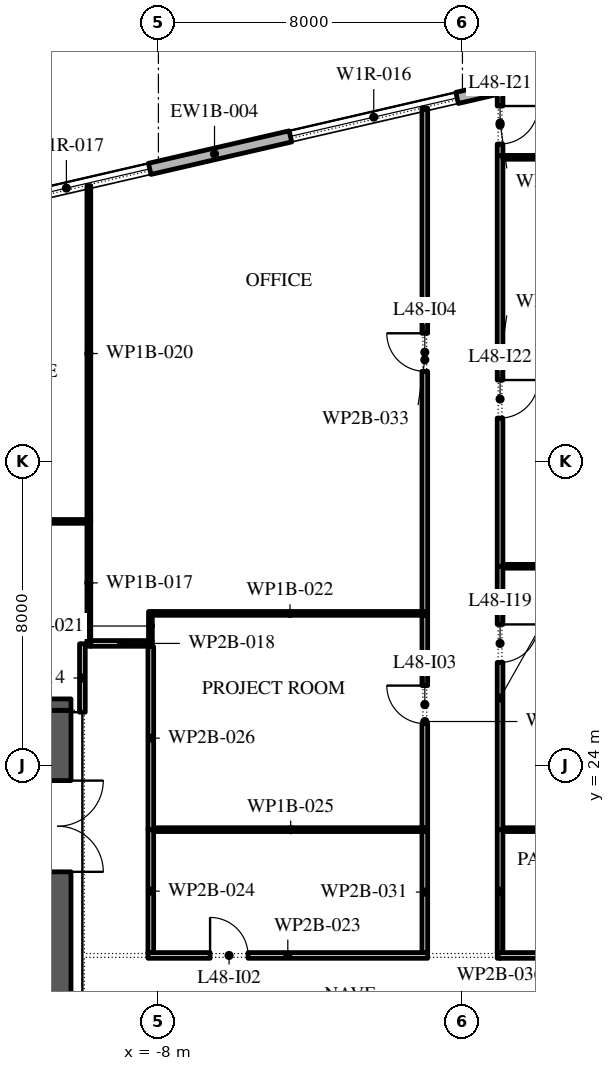
"""IFC4 building model, lengths in metres.
Left out: names, types, materials, properties, quantities, classifications, styles, units other than length and angle.
Written with IfcOpenShell. Run it as: python <this file> out.ifc"""

import sys

from ifc_helpers import new_model, si_unit, direction, frame, frame_2d, origin, place, context, subcontext, project, spatial, rectangle, extrude, element, fill, save


model = new_model("IFC4")
c1 = context("Model", 3, precision=1e-05, world=origin(), true_north=direction((0.0, 1.0)))
c2 = subcontext(c1, "Body", "Model", "MODEL_VIEW")
j1 = project(units=[si_unit("LENGTHUNIT", "METRE"), si_unit("PLANEANGLEUNIT", "RADIAN")], contexts=[c1])
p1 = place(None, origin())
s1 = spatial("IfcSite", under=j1, at=p1, CompositionType="ELEMENT")
p2 = place(p1, origin())
s2 = spatial("IfcBuilding", under=s1, at=p2, CompositionType="ELEMENT")
p3 = place(p2, frame((0.0, 0.0, 217.8)))
s3 = spatial("IfcBuildingStorey", under=s2, at=p3, CompositionType="ELEMENT", Elevation=217.8)
p4 = place(p3, frame((17.592, 45.657, 0.0), z_axis=(0.0, 0.0, 1.0), x_axis=(-0.974370243697, -0.224950279389, 0.0)))
e1 = element("IfcWall", 1, at=p4, inside=s3, PredefinedType="STANDARD", context=c2, shape_type="SweptSolid", body=[
    extrude(rectangle(XDim=49.5, YDim=0.3, at=frame_2d((24.75, 0.0))), origin(), (0.0, 0.0, 1.0), 3.95),
])
p5 = place(p4, frame((3.6, 0.0, 0.0)))
e2 = element("IfcOpeningElement", 2, at=p5, cuts=e1, PredefinedType="OPENING", context=c2, shape_type="SweptSolid", body=[
    extrude(rectangle(XDim=2.4, YDim=2.85, at=frame_2d((1.2, 1.425))), frame((0.0, 0.16, 0.0), z_axis=(0.0, -1.0, 0.0), x_axis=(1.0, 0.0, 0.0)), (0.0, 0.0, 1.0), 0.32),
])
p6 = place(p4, frame((9.9, 0.0, 0.45)))
e3 = element("IfcOpeningElement", 3, at=p6, cuts=e1, PredefinedType="OPENING", context=c2, shape_type="SweptSolid", body=[
    extrude(rectangle(XDim=4.5, YDim=2.4, at=frame_2d((2.25, 1.2))), frame((0.0, 0.16, 0.0), z_axis=(0.0, -1.0, 0.0), x_axis=(1.0, 0.0, 0.0)), (0.0, 0.0, 1.0), 0.32),
])
p7 = place(p4, frame((18.2, 0.0, 0.45)))
e4 = element("IfcOpeningElement", 4, at=p7, cuts=e1, PredefinedType="OPENING", context=c2, shape_type="SweptSolid", body=[
    extrude(rectangle(XDim=4.5, YDim=2.4, at=frame_2d((2.25, 1.2))), frame((0.0, 0.16, 0.0), z_axis=(0.0, -1.0, 0.0), x_axis=(1.0, 0.0, 0.0)), (0.0, 0.0, 1.0), 0.32),
])
p8 = place(p4, frame((26.5, 0.0, 0.45)))
e5 = element("IfcOpeningElement", 5, at=p8, cuts=e1, PredefinedType="OPENING", context=c2, shape_type="SweptSolid", body=[
    extrude(rectangle(XDim=4.5, YDim=2.4, at=frame_2d((2.25, 1.2))), frame((0.0, 0.16, 0.0), z_axis=(0.0, -1.0, 0.0), x_axis=(1.0, 0.0, 0.0)), (0.0, 0.0, 1.0), 0.32),
])
p9 = place(p4, frame((35.85, 0.0, 0.0)))
e6 = element("IfcOpeningElement", 6, at=p9, cuts=e1, PredefinedType="OPENING", context=c2, shape_type="SweptSolid", body=[
    extrude(rectangle(XDim=2.4, YDim=3.5, at=frame_2d((1.2, 1.75))), frame((0.0, 0.16, 0.0), z_axis=(0.0, -1.0, 0.0), x_axis=(1.0, 0.0, 0.0)), (0.0, 0.0, 1.0), 0.32),
])
p10 = place(p4, frame((43.1, 0.0, 0.45)))
e7 = element("IfcOpeningElement", 7, at=p10, cuts=e1, PredefinedType="OPENING", context=c2, shape_type="SweptSolid", body=[
    extrude(rectangle(XDim=4.5, YDim=2.525, at=frame_2d((2.25, 1.262))), frame((0.0, 0.16, 0.0), z_axis=(0.0, -1.0, 0.0), x_axis=(1.0, 0.0, 0.0)), (0.0, 0.0, 1.0), 0.32),
])
p11 = place(p3, frame((-10.65, -2.45, 0.0), z_axis=(0.0, 0.0, 1.0), x_axis=(0.0, 1.0, 0.0)))
e8 = element("IfcWall", 8, at=p11, inside=s3, PredefinedType="SHEAR", context=c2, shape_type="SweptSolid", body=[
    extrude(rectangle(XDim=27.9, YDim=0.7, at=frame_2d((13.95, 0.0))), origin(), (0.0, 0.0, 1.0), 3.95),
])
p12 = place(p11, frame((23.65, 0.0, 0.0)))
e9 = element("IfcOpeningElement", 9, at=p12, cuts=e8, PredefinedType="OPENING", context=c2, shape_type="SweptSolid", body=[
    extrude(rectangle(XDim=2.4, YDim=2.1, at=frame_2d((1.2, 1.05))), frame((0.0, 0.36, 0.0), z_axis=(0.0, -1.0, 0.0), x_axis=(1.0, 0.0, 0.0)), (0.0, 0.0, 1.0), 0.72),
])
p13 = place(p11, frame((1.087, 0.0, 0.0)))
e10 = element("IfcOpeningElement", 10, at=p13, cuts=e8, PredefinedType="OPENING", context=c2, shape_type="SweptSolid", body=[
    extrude(rectangle(XDim=0.9, YDim=2.1, at=frame_2d((0.45, 1.05))), frame((0.0, 0.36, 0.0), z_axis=(0.0, -1.0, 0.0), x_axis=(1.0, 0.0, 0.0)), (0.0, 0.0, 1.0), 0.72),
])
p14 = place(p11, frame((4.262, 0.0, 0.0)))
e11 = element("IfcOpeningElement", 11, at=p14, cuts=e8, PredefinedType="OPENING", context=c2, shape_type="SweptSolid", body=[
    extrude(rectangle(XDim=1.0, YDim=2.1, at=frame_2d((0.5, 1.05))), frame((0.0, 0.36, 0.0), z_axis=(0.0, -1.0, 0.0), x_axis=(1.0, 0.0, 0.0)), (0.0, 0.0, 1.0), 0.72),
])
p15 = place(p3, frame((-21.7, 25.6, 0.0), z_axis=(0.0, 0.0, 1.0), x_axis=(1.0, 0.0, 0.0)))
e12 = element("IfcWall", 12, at=p15, inside=s3, PredefinedType="SHEAR", context=c2, shape_type="SweptSolid", body=[
    extrude(rectangle(XDim=11.4, YDim=0.3, at=frame_2d((5.7, 0.0))), origin(), (0.0, 0.0, 1.0), 3.95),
])
p16 = place(p3, frame((-10.0, 25.4, 0.0), z_axis=(0.0, 0.0, 1.0), x_axis=(0.0, 1.0, 0.0)))
e13 = element("IfcWall", 13, at=p16, inside=s3, PredefinedType="PARTITIONING", context=c2, shape_type="SweptSolid", body=[
    extrude(rectangle(XDim=1.8, YDim=0.15, at=frame_2d((0.9, 0.0))), origin(), (0.0, 0.0, 1.0), 3.95),
])
p17 = place(p3, frame((-9.83, 27.135, 0.0), z_axis=(0.0, 0.0, 1.0), x_axis=(0.0, 1.0, 0.0)))
e14 = element("IfcWall", 14, at=p17, inside=s3, PredefinedType="PARTITIONING", context=c2, shape_type="SweptSolid", body=[
    extrude(rectangle(XDim=3.335, YDim=0.1, at=frame_2d((1.667, 0.0))), origin(), (0.0, 0.0, 1.0), 3.95),
])
p18 = place(p3, frame((-9.78, 27.21, 0.0), z_axis=(0.0, 0.0, 1.0), x_axis=(1.0, 0.0, 0.0)))
e15 = element("IfcWall", 15, at=p18, inside=s3, PredefinedType="PARTITIONING", context=c2, shape_type="SweptSolid", body=[
    extrude(rectangle(XDim=1.62, YDim=0.15, at=frame_2d((0.81, 0.0))), origin(), (0.0, 0.0, 1.0), 3.95),
])
p19 = place(p3, frame((-9.88, 30.42, 0.0), z_axis=(0.0, 0.0, 1.0), x_axis=(-1.0, 0.0, 0.0)))
e16 = element("IfcWall", 16, at=p19, inside=s3, PredefinedType="PARTITIONING", context=c2, shape_type="SweptSolid", body=[
    extrude(rectangle(XDim=12.59, YDim=0.1, at=frame_2d((6.295, 0.0))), origin(), (0.0, 0.0, 1.0), 3.95),
])
p20 = place(p3, frame((-9.83, 30.42, 0.0), z_axis=(0.0, 0.0, 1.0), x_axis=(0.0, 1.0, 0.0)))
e17 = element("IfcWall", 17, at=p20, inside=s3, PredefinedType="PARTITIONING", context=c2, shape_type="SweptSolid", body=[
    extrude(rectangle(XDim=8.835, YDim=0.1, at=frame_2d((4.417, 0.0))), origin(), (0.0, 0.0, 1.0), 3.95),
])
p21 = place(p3, frame((-8.21, 27.285, 0.0), z_axis=(0.0, 0.0, 1.0), x_axis=(0.0, 1.0, 0.0)))
e18 = element("IfcWall", 18, at=p21, inside=s3, PredefinedType="PARTITIONING", context=c2, shape_type="SweptSolid", body=[
    extrude(rectangle(XDim=0.765, YDim=0.1, at=frame_2d((0.383, 0.0))), origin(), (0.0, 0.0, 1.0), 3.95),
])
p22 = place(p3, frame((-8.16, 28.0, 0.0), z_axis=(0.0, 0.0, 1.0), x_axis=(1.0, 0.0, 0.0)))
e19 = element("IfcWall", 19, at=p22, inside=s3, PredefinedType="PARTITIONING", context=c2, shape_type="SweptSolid", body=[
    extrude(rectangle(XDim=7.245, YDim=0.1, at=frame_2d((3.623, 0.0))), origin(), (0.0, 0.0, 1.0), 3.95),
])
p23 = place(p3, frame((-8.275, 19.0, 0.0), z_axis=(0.0, 0.0, 1.0), x_axis=(1.0, 0.0, 0.0)))
e20 = element("IfcWall", 20, at=p23, inside=s3, PredefinedType="PARTITIONING", context=c2, shape_type="SweptSolid", body=[
    extrude(rectangle(XDim=7.36, YDim=0.15, at=frame_2d((3.68, 0.0))), origin(), (0.0, 0.0, 1.0), 3.95),
])
p24 = place(p23, frame((1.635, 0.0, 0.0)))
e21 = element("IfcOpeningElement", 21, at=p24, cuts=e20, PredefinedType="OPENING", context=c2, shape_type="SweptSolid", body=[
    extrude(rectangle(XDim=1.0, YDim=2.1, at=frame_2d((0.5, 1.05))), frame((0.0, 0.085, 0.0), z_axis=(0.0, -1.0, 0.0), x_axis=(1.0, 0.0, 0.0)), (0.0, 0.0, 1.0), 0.17),
])
p25 = place(p3, frame((-8.2, 22.31, 0.0), z_axis=(0.0, 0.0, 1.0), x_axis=(0.0, -1.0, 0.0)))
e22 = element("IfcWall", 22, at=p25, inside=s3, PredefinedType="PARTITIONING", context=c2, shape_type="SweptSolid", body=[
    extrude(rectangle(XDim=3.235, YDim=0.15, at=frame_2d((1.618, 0.0))), origin(), (0.0, 0.0, 1.0), 3.95),
])
p26 = place(p3, frame((-8.125, 22.31, 0.0), z_axis=(0.0, 0.0, 1.0), x_axis=(1.0, 0.0, 0.0)))
e23 = element("IfcWall", 23, at=p26, inside=s3, PredefinedType="PARTITIONING", context=c2, shape_type="SweptSolid", body=[
    extrude(rectangle(XDim=7.21, YDim=0.1, at=frame_2d((3.605, 0.0))), origin(), (0.0, 0.0, 1.0), 3.95),
])
p27 = place(p3, frame((-8.2, 27.125, 0.0), z_axis=(0.0, 0.0, 1.0), x_axis=(0.0, -1.0, 0.0)))
e24 = element("IfcWall", 24, at=p27, inside=s3, PredefinedType="PARTITIONING", context=c2, shape_type="SweptSolid", body=[
    extrude(rectangle(XDim=4.815, YDim=0.15, at=frame_2d((2.407, 0.0))), origin(), (0.0, 0.0, 1.0), 3.95),
])
p28 = place(p3, frame((-0.99, 19.075, 0.0), z_axis=(0.0, 0.0, 1.0), x_axis=(0.0, 1.0, 0.0)))
e25 = element("IfcWall", 25, at=p28, inside=s3, PredefinedType="PARTITIONING", context=c2, shape_type="SweptSolid", body=[
    extrude(rectangle(XDim=3.185, YDim=0.15, at=frame_2d((1.593, 0.0))), origin(), (0.0, 0.0, 1.0), 3.95),
])
p29 = place(p3, frame((-0.99, 22.36, 0.0), z_axis=(0.0, 0.0, 1.0), x_axis=(0.0, 1.0, 0.0)))
e26 = element("IfcWall", 26, at=p29, inside=s3, PredefinedType="PARTITIONING", context=c2, shape_type="SweptSolid", body=[
    extrude(rectangle(XDim=5.59, YDim=0.15, at=frame_2d((2.795, 0.0))), origin(), (0.0, 0.0, 1.0), 3.95),
])
p30 = place(p29, frame((2.74, 0.0, 0.0)))
e27 = element("IfcOpeningElement", 27, at=p30, cuts=e26, PredefinedType="OPENING", context=c2, shape_type="SweptSolid", body=[
    extrude(rectangle(XDim=1.0, YDim=2.1, at=frame_2d((0.5, 1.05))), frame((0.0, 0.085, 0.0), z_axis=(0.0, -1.0, 0.0), x_axis=(1.0, 0.0, 0.0)), (0.0, 0.0, 1.0), 0.17),
])
p31 = place(p3, frame((-0.99, 28.05, 0.0), z_axis=(0.0, 0.0, 1.0), x_axis=(0.0, 1.0, 0.0)))
e28 = element("IfcWall", 28, at=p31, inside=s3, PredefinedType="PARTITIONING", context=c2, shape_type="SweptSolid", body=[
    extrude(rectangle(XDim=13.246, YDim=0.15, at=frame_2d((6.623, 0.0))), origin(), (0.0, 0.0, 1.0), 3.95),
])
p32 = place(p31, frame((6.32, 0.0, 0.0)))
e29 = element("IfcOpeningElement", 29, at=p32, cuts=e28, PredefinedType="OPENING", context=c2, shape_type="SweptSolid", body=[
    extrude(rectangle(XDim=1.0, YDim=2.1, at=frame_2d((0.5, 1.05))), frame((0.0, 0.085, 0.0), z_axis=(0.0, -1.0, 0.0), x_axis=(1.0, 0.0, 0.0)), (0.0, 0.0, 1.0), 0.17),
])
p33 = place(p3, frame((0.915, 19.0, 0.0), z_axis=(0.0, 0.0, 1.0), x_axis=(1.0, 0.0, 0.0)))
e30 = element("IfcWall", 30, at=p33, inside=s3, PredefinedType="PARTITIONING", context=c2, shape_type="SweptSolid", body=[
    extrude(rectangle(XDim=7.36, YDim=0.15, at=frame_2d((3.68, 0.0))), origin(), (0.0, 0.0, 1.0), 3.95),
])
p34 = place(p33, frame((2.385, 0.0, 0.0)))
e31 = element("IfcOpeningElement", 31, at=p34, cuts=e30, PredefinedType="OPENING", context=c2, shape_type="SweptSolid", body=[
    extrude(rectangle(XDim=1.0, YDim=2.1, at=frame_2d((0.5, 1.05))), frame((0.0, 0.085, 0.0), z_axis=(0.0, -1.0, 0.0), x_axis=(1.0, 0.0, 0.0)), (0.0, 0.0, 1.0), 0.17),
])
p35 = place(p3, frame((0.99, 22.31, 0.0), z_axis=(0.0, 0.0, 1.0), x_axis=(0.0, -1.0, 0.0)))
e32 = element("IfcWall", 32, at=p35, inside=s3, PredefinedType="PARTITIONING", context=c2, shape_type="SweptSolid", body=[
    extrude(rectangle(XDim=3.235, YDim=0.15, at=frame_2d((1.618, 0.0))), origin(), (0.0, 0.0, 1.0), 3.95),
])
p36 = place(p3, frame((1.065, 22.31, 0.0), z_axis=(0.0, 0.0, 1.0), x_axis=(1.0, 0.0, 0.0)))
e33 = element("IfcWall", 33, at=p36, inside=s3, PredefinedType="PARTITIONING", context=c2, shape_type="SweptSolid", body=[
    extrude(rectangle(XDim=7.21, YDim=0.1, at=frame_2d((3.605, 0.0))), origin(), (0.0, 0.0, 1.0), 3.95),
])
p37 = place(p3, frame((0.99, 29.24, 0.0), z_axis=(0.0, 0.0, 1.0), x_axis=(0.0, -1.0, 0.0)))
e34 = element("IfcWall", 34, at=p37, inside=s3, PredefinedType="PARTITIONING", context=c2, shape_type="SweptSolid", body=[
    extrude(rectangle(XDim=6.93, YDim=0.15, at=frame_2d((3.465, 0.0))), origin(), (0.0, 0.0, 1.0), 3.95),
])
p38 = place(p37, frame((1.53, 0.0, 0.0)))
e35 = element("IfcOpeningElement", 35, at=p38, cuts=e34, PredefinedType="OPENING", context=c2, shape_type="SweptSolid", body=[
    extrude(rectangle(XDim=1.0, YDim=2.1, at=frame_2d((0.5, 1.05))), frame((0.0, 0.085, 0.0), z_axis=(0.0, -1.0, 0.0), x_axis=(1.0, 0.0, 0.0)), (0.0, 0.0, 1.0), 0.17),
])
p39 = place(p3, frame((1.065, 29.24, 0.0), z_axis=(0.0, 0.0, 1.0), x_axis=(1.0, 0.0, 0.0)))
e36 = element("IfcWall", 36, at=p39, inside=s3, PredefinedType="PARTITIONING", context=c2, shape_type="SweptSolid", body=[
    extrude(rectangle(XDim=7.145, YDim=0.1, at=frame_2d((3.573, 0.0))), origin(), (0.0, 0.0, 1.0), 3.95),
])
p40 = place(p3, frame((0.99, 40.05, 0.0), z_axis=(0.0, 0.0, 1.0), x_axis=(0.0, -1.0, 0.0)))
e37 = element("IfcWall", 37, at=p40, inside=s3, PredefinedType="PARTITIONING", context=c2, shape_type="SweptSolid", body=[
    extrude(rectangle(XDim=10.81, YDim=0.15, at=frame_2d((5.405, 0.0))), origin(), (0.0, 0.0, 1.0), 3.95),
])
p41 = place(p40, frame((5.91, 0.0, 0.0)))
e38 = element("IfcOpeningElement", 38, at=p41, cuts=e37, PredefinedType="OPENING", context=c2, shape_type="SweptSolid", body=[
    extrude(rectangle(XDim=1.0, YDim=2.1, at=frame_2d((0.5, 1.05))), frame((0.0, 0.085, 0.0), z_axis=(0.0, -1.0, 0.0), x_axis=(1.0, 0.0, 0.0)), (0.0, 0.0, 1.0), 0.17),
])
p42 = place(p3, frame((0.99, 41.753, 0.0), z_axis=(0.0, 0.0, 1.0), x_axis=(0.0, -1.0, 0.0)))
e39 = element("IfcWall", 39, at=p42, inside=s3, PredefinedType="PARTITIONING", context=c2, shape_type="SweptSolid", body=[
    extrude(rectangle(XDim=1.703, YDim=0.15, at=frame_2d((0.852, 0.0))), origin(), (0.0, 0.0, 1.0), 3.95),
])
p43 = place(p42, frame((0.403, 0.0, 0.0)))
e40 = element("IfcOpeningElement", 40, at=p43, cuts=e39, PredefinedType="OPENING", context=c2, shape_type="SweptSolid", body=[
    extrude(rectangle(XDim=1.0, YDim=2.1, at=frame_2d((0.5, 1.05))), frame((0.0, 0.085, 0.0), z_axis=(0.0, -1.0, 0.0), x_axis=(1.0, 0.0, 0.0)), (0.0, 0.0, 1.0), 0.17),
])
p44 = place(p3, frame((14.48, 40.0, 0.0), z_axis=(0.0, 0.0, 1.0), x_axis=(-1.0, 0.0, 0.0)))
e41 = element("IfcWall", 41, at=p44, inside=s3, PredefinedType="PARTITIONING", context=c2, shape_type="SweptSolid", body=[
    extrude(rectangle(XDim=13.415, YDim=0.1, at=frame_2d((6.708, 0.0))), origin(), (0.0, 0.0, 1.0), 3.95),
])
p45 = place(p7, origin())
e42 = element("IfcWindow", 42, at=p45, inside=s3, PartitioningType="DOUBLE_PANEL_VERTICAL", PredefinedType="WINDOW", context=c2, shape_type="SweptSolid", body=[
    extrude(rectangle(XDim=4.5, YDim=2.4, at=frame_2d((2.25, 1.2))), frame((0.0, 0.03, 0.0), z_axis=(0.0, -1.0, 0.0), x_axis=(1.0, 0.0, 0.0)), (0.0, 0.0, 1.0), 0.06),
])
fill(e4, e42)
p46 = place(p8, origin())
e43 = element("IfcWindow", 43, at=p46, inside=s3, PartitioningType="DOUBLE_PANEL_VERTICAL", PredefinedType="WINDOW", context=c2, shape_type="SweptSolid", body=[
    extrude(rectangle(XDim=4.5, YDim=2.4, at=frame_2d((2.25, 1.2))), frame((0.0, 0.03, 0.0), z_axis=(0.0, -1.0, 0.0), x_axis=(1.0, 0.0, 0.0)), (0.0, 0.0, 1.0), 0.06),
])
fill(e5, e43)
p47 = place(p12, frame((2.4, 0.0, 0.0), z_axis=(0.0, 0.0, 1.0), x_axis=(-1.0, 0.0, 0.0)))
e44 = element("IfcDoor", 44, at=p47, inside=s3, OperationType="DOUBLE_DOOR_SINGLE_SWING", PredefinedType="DOOR", context=c2, shape_type="SweptSolid", body=[
    extrude(rectangle(XDim=2.4, YDim=2.1, at=frame_2d((1.2, 1.05))), frame((0.0, 0.025, 0.0), z_axis=(0.0, -1.0, 0.0), x_axis=(1.0, 0.0, 0.0)), (0.0, 0.0, 1.0), 0.05),
])
fill(e9, e44)
p48 = place(p24, origin())
e45 = element("IfcDoor", 45, at=p48, inside=s3, OperationType="SINGLE_SWING_RIGHT", PredefinedType="DOOR", context=c2, shape_type="SweptSolid", body=[
    extrude(rectangle(XDim=1.0, YDim=2.1, at=frame_2d((0.5, 1.05))), frame((0.0, 0.025, 0.0), z_axis=(0.0, -1.0, 0.0), x_axis=(1.0, 0.0, 0.0)), (0.0, 0.0, 1.0), 0.05),
])
fill(e21, e45)
p49 = place(p30, origin())
e46 = element("IfcDoor", 46, at=p49, inside=s3, OperationType="SINGLE_SWING_LEFT", PredefinedType="DOOR", context=c2, shape_type="SweptSolid", body=[
    extrude(rectangle(XDim=1.0, YDim=2.1, at=frame_2d((0.5, 1.05))), frame((0.0, 0.025, 0.0), z_axis=(0.0, -1.0, 0.0), x_axis=(1.0, 0.0, 0.0)), (0.0, 0.0, 1.0), 0.05),
])
fill(e27, e46)
p50 = place(p32, origin())
e47 = element("IfcDoor", 47, at=p50, inside=s3, OperationType="SINGLE_SWING_LEFT", PredefinedType="DOOR", context=c2, shape_type="SweptSolid", body=[
    extrude(rectangle(XDim=1.0, YDim=2.1, at=frame_2d((0.5, 1.05))), frame((0.0, 0.025, 0.0), z_axis=(0.0, -1.0, 0.0), x_axis=(1.0, 0.0, 0.0)), (0.0, 0.0, 1.0), 0.05),
])
fill(e29, e47)
p51 = place(p38, origin())
e48 = element("IfcDoor", 48, at=p51, inside=s3, OperationType="SINGLE_SWING_RIGHT", PredefinedType="DOOR", context=c2, shape_type="SweptSolid", body=[
    extrude(rectangle(XDim=1.0, YDim=2.1, at=frame_2d((0.5, 1.05))), frame((0.0, 0.025, 0.0), z_axis=(0.0, -1.0, 0.0), x_axis=(1.0, 0.0, 0.0)), (0.0, 0.0, 1.0), 0.05),
])
fill(e35, e48)
p52 = place(p43, origin())
e49 = element("IfcDoor", 49, at=p52, inside=s3, OperationType="SINGLE_SWING_RIGHT", PredefinedType="DOOR", context=c2, shape_type="SweptSolid", body=[
    extrude(rectangle(XDim=1.0, YDim=2.1, at=frame_2d((0.5, 1.05))), frame((0.0, 0.025, 0.0), z_axis=(0.0, -1.0, 0.0), x_axis=(1.0, 0.0, 0.0)), (0.0, 0.0, 1.0), 0.05),
])
fill(e40, e49)
p53 = place(p41, origin())
e50 = element("IfcDoor", 50, at=p53, inside=s3, OperationType="SINGLE_SWING_RIGHT", PredefinedType="DOOR", context=c2, shape_type="SweptSolid", body=[
    extrude(rectangle(XDim=1.0, YDim=2.1, at=frame_2d((0.5, 1.05))), frame((0.0, 0.025, 0.0), z_axis=(0.0, -1.0, 0.0), x_axis=(1.0, 0.0, 0.0)), (0.0, 0.0, 1.0), 0.05),
])
fill(e38, e50)
save(model, sys.argv[1])
